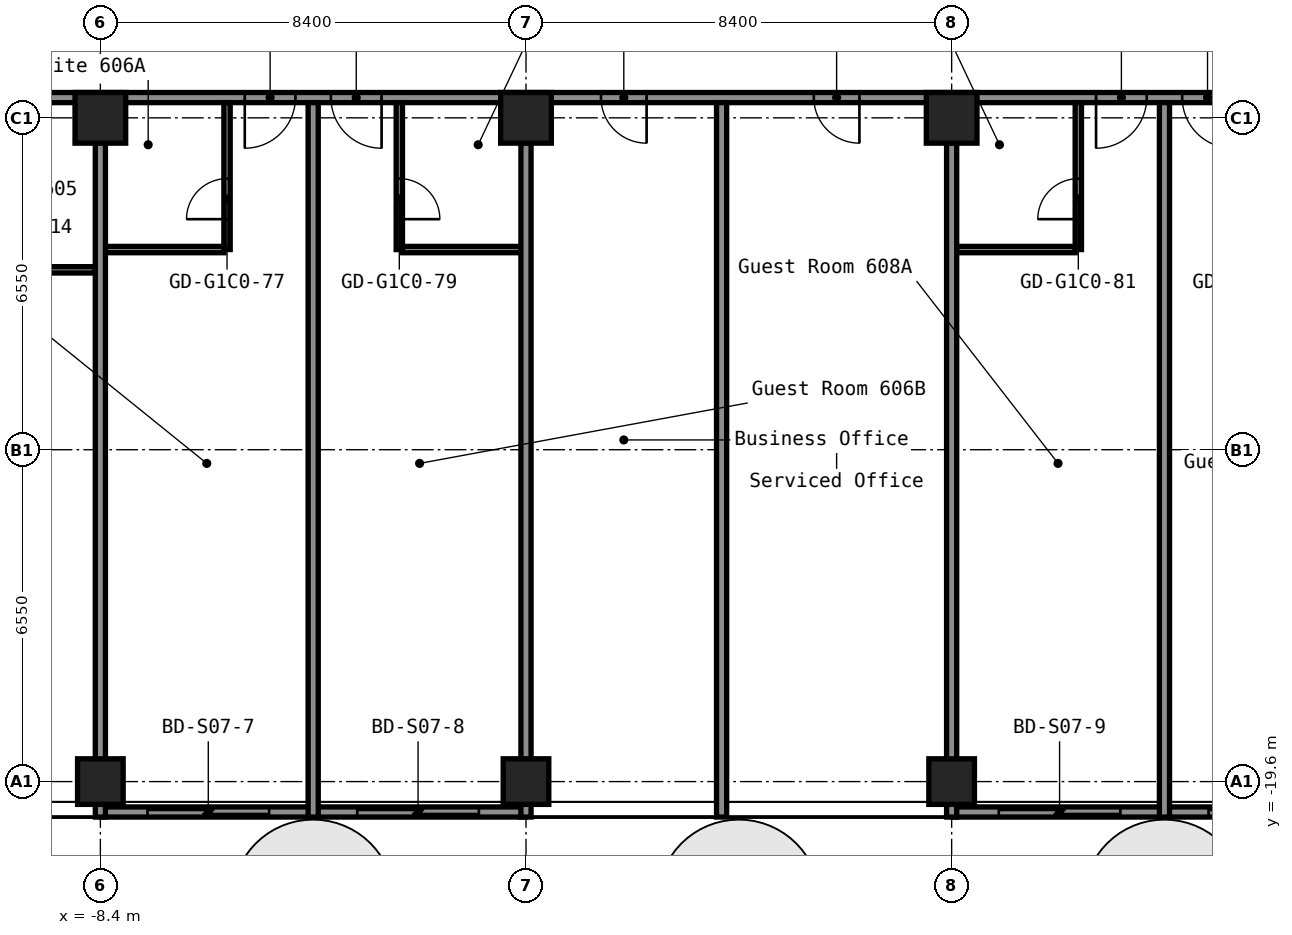
"""IFC4 building model, lengths in metres.
Left out: names, types, materials, properties, quantities, classifications, styles, units other than length and angle.
Written with IfcOpenShell. Run it as: python <this file> out.ifc"""

import sys

from ifc_helpers import new_model, si_unit, direction, frame, frame_2d, origin, origin_2d, place, context, subcontext, project, spatial, rectangle, hollow_rectangle, extrude, element, fill, save


model = new_model("IFC4")
c1 = context("Model", 3, precision=1e-05, world=origin(), true_north=direction((0.0, 1.0)))
c2 = subcontext(c1, "Body", "Model", "MODEL_VIEW")
j1 = project(units=[si_unit("LENGTHUNIT", "METRE"), si_unit("PLANEANGLEUNIT", "RADIAN")], contexts=[c1])
p1 = place(None, origin())
s1 = spatial("IfcSite", under=j1, at=p1, CompositionType="ELEMENT")
p2 = place(p1, origin())
s2 = spatial("IfcBuilding", under=s1, at=p2, CompositionType="ELEMENT")
p3 = place(p2, frame((0.0, 0.0, 26.2)))
s3 = spatial("IfcBuildingStorey", under=s2, at=p3, CompositionType="ELEMENT", Elevation=26.2)
p4 = place(p3, frame((-8.4, -19.6, 0.0), z_axis=(0.0, 0.0, 1.0), x_axis=(1.0, 0.0, 0.0)))
e1 = element("IfcColumn", 1, at=p4, inside=s3, PredefinedType="COLUMN", context=c2, shape_type="SweptSolid", body=[
    extrude(hollow_rectangle(XDim=0.9, YDim=0.9, WallThickness=0.036, at=origin_2d()), origin(), (0.0, 0.0, 1.0), 2.8),
])
p5 = place(p3, frame((-8.4, -6.5, 0.0), z_axis=(0.0, 0.0, 1.0), x_axis=(1.0, 0.0, 0.0)))
e2 = element("IfcColumn", 2, at=p5, inside=s3, PredefinedType="COLUMN", context=c2, shape_type="SweptSolid", body=[
    extrude(hollow_rectangle(XDim=1.0, YDim=1.0, WallThickness=0.04, at=origin_2d()), origin(), (0.0, 0.0, 1.0), 2.8),
])
p6 = place(p3, frame((0.0, -19.6, 0.0), z_axis=(0.0, 0.0, 1.0), x_axis=(1.0, 0.0, 0.0)))
e3 = element("IfcColumn", 3, at=p6, inside=s3, PredefinedType="COLUMN", context=c2, shape_type="SweptSolid", body=[
    extrude(hollow_rectangle(XDim=0.9, YDim=0.9, WallThickness=0.036, at=origin_2d()), origin(), (0.0, 0.0, 1.0), 2.8),
])
p7 = place(p3, frame((0.0, -6.5, 0.0), z_axis=(0.0, 0.0, 1.0), x_axis=(1.0, 0.0, 0.0)))
e4 = element("IfcColumn", 4, at=p7, inside=s3, PredefinedType="COLUMN", context=c2, shape_type="SweptSolid", body=[
    extrude(hollow_rectangle(XDim=1.0, YDim=1.0, WallThickness=0.04, at=origin_2d()), origin(), (0.0, 0.0, 1.0), 2.8),
])
p8 = place(p3, frame((8.4, -19.6, 0.0), z_axis=(0.0, 0.0, 1.0), x_axis=(1.0, 0.0, 0.0)))
e5 = element("IfcColumn", 5, at=p8, inside=s3, PredefinedType="COLUMN", context=c2, shape_type="SweptSolid", body=[
    extrude(hollow_rectangle(XDim=0.9, YDim=0.9, WallThickness=0.036, at=origin_2d()), origin(), (0.0, 0.0, 1.0), 2.8),
])
p9 = place(p3, frame((8.4, -6.5, 0.0), z_axis=(0.0, 0.0, 1.0), x_axis=(1.0, 0.0, 0.0)))
e6 = element("IfcColumn", 6, at=p9, inside=s3, PredefinedType="COLUMN", context=c2, shape_type="SweptSolid", body=[
    extrude(hollow_rectangle(XDim=1.0, YDim=1.0, WallThickness=0.04, at=origin_2d()), origin(), (0.0, 0.0, 1.0), 2.8),
])
p10 = place(p3, frame((-11.738, -9.5, 0.0), z_axis=(0.0, 0.0, 1.0), x_axis=(1.0, 0.0, 0.0)))
e7 = element("IfcWall", 7, at=p10, inside=s3, PredefinedType="PARTITIONING", context=c2, shape_type="SweptSolid", body=[
    extrude(rectangle(XDim=3.238, YDim=0.125, at=frame_2d((1.619, 0.0))), origin(), (0.0, 0.0, 1.0), 2.8),
])
p11 = place(p10, frame((1.238, 0.0, 0.0)))
e8 = element("IfcOpeningElement", 8, at=p11, cuts=e7, PredefinedType="OPENING", context=c2, shape_type="SweptSolid", body=[
    extrude(rectangle(XDim=0.8, YDim=2.1, at=frame_2d((0.4, 1.05))), frame((0.0, 0.073, 0.0), z_axis=(0.0, -1.0, 0.0), x_axis=(1.0, 0.0, 0.0)), (0.0, 0.0, 1.0), 0.145),
])
p12 = place(p3, frame((-8.3, -9.1, 0.0), z_axis=(0.0, 0.0, 1.0), x_axis=(1.0, 0.0, 0.0)))
e9 = element("IfcWall", 9, at=p12, inside=s3, PredefinedType="PARTITIONING", context=c2, shape_type="SweptSolid", body=[
    extrude(rectangle(XDim=2.338, YDim=0.125, at=frame_2d((1.169, 0.0))), origin(), (0.0, 0.0, 1.0), 2.8),
])
for number, where, z_axis, x_axis in (
    (10, (-2.438, -9.1, 0.0), (0.0, 0.0, 1.0), (1.0, 0.0, 0.0)),
    (11, (8.5, -9.1, 0.0), (0.0, 0.0, 1.0), (1.0, 0.0, 0.0)),
):
    element("IfcWall", number, at=place(p3, frame(where, z_axis=z_axis, x_axis=x_axis)), inside=s3, PredefinedType="PARTITIONING", context=c2, shape_type="SweptSolid", body=[
        extrude(rectangle(XDim=2.337, YDim=0.125, at=frame_2d((1.169, 0.0))), origin(), (0.0, 0.0, 1.0), 2.8),
    ])
p13 = place(p3, frame((-16.8, -6.1, 0.0), z_axis=(0.0, 0.0, 1.0), x_axis=(1.0, 0.0, 0.0)))
e12 = element("IfcWall", 12, at=p13, inside=s3, PredefinedType="PARTITIONING", context=c2, shape_type="SweptSolid", body=[
    extrude(rectangle(XDim=33.6, YDim=0.2, at=frame_2d((16.8, 0.0))), origin(), (0.0, 0.0, 1.0), 2.8),
])
p14 = place(p13, frame((2.0, 0.0, 0.0)))
e13 = element("IfcOpeningElement", 13, at=p14, cuts=e12, PredefinedType="OPENING", context=c2, shape_type="SweptSolid", body=[
    extrude(rectangle(XDim=1.0, YDim=2.1, at=frame_2d((0.5, 1.05))), frame((0.0, 0.11, 0.0), z_axis=(0.0, -1.0, 0.0), x_axis=(1.0, 0.0, 0.0)), (0.0, 0.0, 1.0), 0.22),
])
p15 = place(p13, frame((11.25, 0.0, 0.0)))
e14 = element("IfcOpeningElement", 14, at=p15, cuts=e12, PredefinedType="OPENING", context=c2, shape_type="SweptSolid", body=[
    extrude(rectangle(XDim=1.0, YDim=2.1, at=frame_2d((0.5, 1.05))), frame((0.0, 0.11, 0.0), z_axis=(0.0, -1.0, 0.0), x_axis=(1.0, 0.0, 0.0)), (0.0, 0.0, 1.0), 0.22),
])
p16 = place(p13, frame((12.95, 0.0, 0.0)))
e15 = element("IfcOpeningElement", 15, at=p16, cuts=e12, PredefinedType="OPENING", context=c2, shape_type="SweptSolid", body=[
    extrude(rectangle(XDim=1.0, YDim=2.1, at=frame_2d((0.5, 1.05))), frame((0.0, 0.11, 0.0), z_axis=(0.0, -1.0, 0.0), x_axis=(1.0, 0.0, 0.0)), (0.0, 0.0, 1.0), 0.22),
])
p17 = place(p13, frame((18.28, 0.0, 0.0)))
e16 = element("IfcOpeningElement", 16, at=p17, cuts=e12, PredefinedType="OPENING", context=c2, shape_type="SweptSolid", body=[
    extrude(rectangle(XDim=0.9, YDim=2.1, at=frame_2d((0.45, 1.05))), frame((0.0, 0.11, 0.0), z_axis=(0.0, -1.0, 0.0), x_axis=(1.0, 0.0, 0.0)), (0.0, 0.0, 1.0), 0.22),
])
p18 = place(p13, frame((22.48, 0.0, 0.0)))
e17 = element("IfcOpeningElement", 17, at=p18, cuts=e12, PredefinedType="OPENING", context=c2, shape_type="SweptSolid", body=[
    extrude(rectangle(XDim=0.9, YDim=2.1, at=frame_2d((0.45, 1.05))), frame((0.0, 0.11, 0.0), z_axis=(0.0, -1.0, 0.0), x_axis=(1.0, 0.0, 0.0)), (0.0, 0.0, 1.0), 0.22),
])
p19 = place(p13, frame((28.05, 0.0, 0.0)))
e18 = element("IfcOpeningElement", 18, at=p19, cuts=e12, PredefinedType="OPENING", context=c2, shape_type="SweptSolid", body=[
    extrude(rectangle(XDim=1.0, YDim=2.1, at=frame_2d((0.5, 1.05))), frame((0.0, 0.11, 0.0), z_axis=(0.0, -1.0, 0.0), x_axis=(1.0, 0.0, 0.0)), (0.0, 0.0, 1.0), 0.22),
])
p20 = place(p13, frame((29.75, 0.0, 0.0)))
e19 = element("IfcOpeningElement", 19, at=p20, cuts=e12, PredefinedType="OPENING", context=c2, shape_type="SweptSolid", body=[
    extrude(rectangle(XDim=1.0, YDim=2.1, at=frame_2d((0.5, 1.05))), frame((0.0, 0.11, 0.0), z_axis=(0.0, -1.0, 0.0), x_axis=(1.0, 0.0, 0.0)), (0.0, 0.0, 1.0), 0.22),
])
p21 = place(p3, frame((-8.4, -20.3, 0.0), z_axis=(0.0, 0.0, 1.0), x_axis=(0.0, 1.0, 0.0)))
e20 = element("IfcWall", 20, at=p21, inside=s3, PredefinedType="PARTITIONING", context=c2, shape_type="SweptSolid", body=[
    extrude(rectangle(XDim=13.31, YDim=0.2, at=frame_2d((6.655, 0.0))), origin(), (0.0, 0.0, 1.0), 2.8),
])
p22 = place(p3, frame((-5.9, -9.1, 0.0), z_axis=(0.0, 0.0, 1.0), x_axis=(0.0, 1.0, 0.0)))
e21 = element("IfcWall", 21, at=p22, inside=s3, PredefinedType="PARTITIONING", context=c2, shape_type="SweptSolid", body=[
    extrude(rectangle(XDim=2.9, YDim=0.125, at=frame_2d((1.45, 0.0))), origin(), (0.0, 0.0, 1.0), 2.8),
])
p23 = place(p22, frame((0.6, 0.0, 0.0)))
e22 = element("IfcOpeningElement", 22, at=p23, cuts=e21, PredefinedType="OPENING", context=c2, shape_type="SweptSolid", body=[
    extrude(rectangle(XDim=0.8, YDim=2.1, at=frame_2d((0.4, 1.05))), frame((0.0, 0.073, 0.0), z_axis=(0.0, -1.0, 0.0), x_axis=(1.0, 0.0, 0.0)), (0.0, 0.0, 1.0), 0.145),
])
p24 = place(p3, frame((-4.2, -20.3, 0.0), z_axis=(0.0, 0.0, 1.0), x_axis=(0.0, 1.0, 0.0)))
e23 = element("IfcWall", 23, at=p24, inside=s3, PredefinedType="PARTITIONING", context=c2, shape_type="SweptSolid", body=[
    extrude(rectangle(XDim=14.1, YDim=0.2, at=frame_2d((7.05, 0.0))), origin(), (0.0, 0.0, 1.0), 2.8),
])
p25 = place(p3, frame((-2.5, -9.1, 0.0), z_axis=(0.0, 0.0, 1.0), x_axis=(0.0, 1.0, 0.0)))
e24 = element("IfcWall", 24, at=p25, inside=s3, PredefinedType="PARTITIONING", context=c2, shape_type="SweptSolid", body=[
    extrude(rectangle(XDim=2.9, YDim=0.125, at=frame_2d((1.45, 0.0))), origin(), (0.0, 0.0, 1.0), 2.8),
])
p26 = place(p25, frame((0.6, 0.0, 0.0)))
e25 = element("IfcOpeningElement", 25, at=p26, cuts=e24, PredefinedType="OPENING", context=c2, shape_type="SweptSolid", body=[
    extrude(rectangle(XDim=0.8, YDim=2.1, at=frame_2d((0.4, 1.05))), frame((0.0, 0.073, 0.0), z_axis=(0.0, -1.0, 0.0), x_axis=(1.0, 0.0, 0.0)), (0.0, 0.0, 1.0), 0.145),
])
p27 = place(p3, frame((0.0, -20.3, 0.0), z_axis=(0.0, 0.0, 1.0), x_axis=(0.0, 1.0, 0.0)))
e26 = element("IfcWall", 26, at=p27, inside=s3, PredefinedType="PARTITIONING", context=c2, shape_type="SweptSolid", body=[
    extrude(rectangle(XDim=13.31, YDim=0.2, at=frame_2d((6.655, 0.0))), origin(), (0.0, 0.0, 1.0), 2.8),
])
p28 = place(p3, frame((3.86, -20.3, 0.0), z_axis=(0.0, 0.0, 1.0), x_axis=(0.0, 1.0, 0.0)))
e27 = element("IfcWall", 27, at=p28, inside=s3, PredefinedType="PARTITIONING", context=c2, shape_type="SweptSolid", body=[
    extrude(rectangle(XDim=14.1, YDim=0.2, at=frame_2d((7.05, 0.0))), origin(), (0.0, 0.0, 1.0), 2.8),
])
p29 = place(p3, frame((8.4, -20.3, 0.0), z_axis=(0.0, 0.0, 1.0), x_axis=(0.0, 1.0, 0.0)))
e28 = element("IfcWall", 28, at=p29, inside=s3, PredefinedType="PARTITIONING", context=c2, shape_type="SweptSolid", body=[
    extrude(rectangle(XDim=13.31, YDim=0.2, at=frame_2d((6.655, 0.0))), origin(), (0.0, 0.0, 1.0), 2.8),
])
p30 = place(p3, frame((10.9, -9.1, 0.0), z_axis=(0.0, 0.0, 1.0), x_axis=(0.0, 1.0, 0.0)))
e29 = element("IfcWall", 29, at=p30, inside=s3, PredefinedType="PARTITIONING", context=c2, shape_type="SweptSolid", body=[
    extrude(rectangle(XDim=2.9, YDim=0.125, at=frame_2d((1.45, 0.0))), origin(), (0.0, 0.0, 1.0), 2.8),
])
p31 = place(p30, frame((0.6, 0.0, 0.0)))
e30 = element("IfcOpeningElement", 30, at=p31, cuts=e29, PredefinedType="OPENING", context=c2, shape_type="SweptSolid", body=[
    extrude(rectangle(XDim=0.8, YDim=2.1, at=frame_2d((0.4, 1.05))), frame((0.0, 0.073, 0.0), z_axis=(0.0, -1.0, 0.0), x_axis=(1.0, 0.0, 0.0)), (0.0, 0.0, 1.0), 0.145),
])
p32 = place(p3, frame((12.6, -20.3, 0.0), z_axis=(0.0, 0.0, 1.0), x_axis=(0.0, 1.0, 0.0)))
e31 = element("IfcWall", 31, at=p32, inside=s3, PredefinedType="PARTITIONING", context=c2, shape_type="SweptSolid", body=[
    extrude(rectangle(XDim=14.1, YDim=0.2, at=frame_2d((7.05, 0.0))), origin(), (0.0, 0.0, 1.0), 2.8),
])
p33 = place(p3, frame((-8.38, -20.2, 0.0), z_axis=(0.0, 0.0, 1.0), x_axis=(1.0, 0.0, 0.0)))
p34 = place(p33, frame((0.91, 0.0, 0.0)))
p35 = place(p34, frame((2.4, 0.0, 0.0), z_axis=(0.0, 0.0, 1.0), x_axis=(-1.0, 0.0, 0.0)))
e32 = element("IfcDoor", 32, at=p35, inside=s3, OperationType="SLIDING_TO_LEFT", PredefinedType="DOOR", context=c2, shape_type="SweptSolid", body=[
    extrude(rectangle(XDim=2.4, YDim=2.2, at=frame_2d((1.2, 1.1))), frame((0.0, 0.025, 0.0), z_axis=(0.0, -1.0, 0.0), x_axis=(1.0, 0.0, 0.0)), (0.0, 0.0, 1.0), 0.05),
])
p36 = place(p3, frame((-4.24, -20.2, 0.0), z_axis=(0.0, 0.0, 1.0), x_axis=(1.0, 0.0, 0.0)))
p37 = place(p36, frame((0.91, 0.0, 0.0)))
p38 = place(p37, frame((2.4, 0.0, 0.0), z_axis=(0.0, 0.0, 1.0), x_axis=(-1.0, 0.0, 0.0)))
e33 = element("IfcDoor", 33, at=p38, inside=s3, OperationType="SLIDING_TO_LEFT", PredefinedType="DOOR", context=c2, shape_type="SweptSolid", body=[
    extrude(rectangle(XDim=2.4, YDim=2.2, at=frame_2d((1.2, 1.1))), frame((0.0, 0.025, 0.0), z_axis=(0.0, -1.0, 0.0), x_axis=(1.0, 0.0, 0.0)), (0.0, 0.0, 1.0), 0.05),
])
p39 = place(p3, frame((8.42, -20.2, 0.0), z_axis=(0.0, 0.0, 1.0), x_axis=(1.0, 0.0, 0.0)))
p40 = place(p39, frame((0.91, 0.0, 0.0)))
p41 = place(p40, frame((2.4, 0.0, 0.0), z_axis=(0.0, 0.0, 1.0), x_axis=(-1.0, 0.0, 0.0)))
e34 = element("IfcDoor", 34, at=p41, inside=s3, OperationType="SLIDING_TO_LEFT", PredefinedType="DOOR", context=c2, shape_type="SweptSolid", body=[
    extrude(rectangle(XDim=2.4, YDim=2.2, at=frame_2d((1.2, 1.1))), frame((0.0, 0.025, 0.0), z_axis=(0.0, -1.0, 0.0), x_axis=(1.0, 0.0, 0.0)), (0.0, 0.0, 1.0), 0.05),
])
p42 = place(p3, frame((12.56, -20.2, 0.0), z_axis=(0.0, 0.0, 1.0), x_axis=(1.0, 0.0, 0.0)))
p43 = place(p42, frame((0.91, 0.0, 0.0)))
p44 = place(p43, frame((2.4, 0.0, 0.0), z_axis=(0.0, 0.0, 1.0), x_axis=(-1.0, 0.0, 0.0)))
e35 = element("IfcDoor", 35, at=p44, inside=s3, OperationType="SLIDING_TO_LEFT", PredefinedType="DOOR", context=c2, shape_type="SweptSolid", body=[
    extrude(rectangle(XDim=2.4, YDim=2.2, at=frame_2d((1.2, 1.1))), frame((0.0, 0.025, 0.0), z_axis=(0.0, -1.0, 0.0), x_axis=(1.0, 0.0, 0.0)), (0.0, 0.0, 1.0), 0.05),
])
p45 = place(p15, origin())
e36 = element("IfcDoor", 36, at=p45, inside=s3, OperationType="SINGLE_SWING_LEFT", PredefinedType="DOOR", context=c2, shape_type="SweptSolid", body=[
    extrude(rectangle(XDim=1.0, YDim=2.1, at=frame_2d((0.5, 1.05))), frame((0.0, 0.025, 0.0), z_axis=(0.0, -1.0, 0.0), x_axis=(1.0, 0.0, 0.0)), (0.0, 0.0, 1.0), 0.05),
])
fill(e14, e36)
p46 = place(p16, origin())
e37 = element("IfcDoor", 37, at=p46, inside=s3, OperationType="SINGLE_SWING_RIGHT", PredefinedType="DOOR", context=c2, shape_type="SweptSolid", body=[
    extrude(rectangle(XDim=1.0, YDim=2.1, at=frame_2d((0.5, 1.05))), frame((0.0, 0.025, 0.0), z_axis=(0.0, -1.0, 0.0), x_axis=(1.0, 0.0, 0.0)), (0.0, 0.0, 1.0), 0.05),
])
fill(e15, e37)
p47 = place(p17, origin())
e38 = element("IfcDoor", 38, at=p47, inside=s3, OperationType="SINGLE_SWING_RIGHT", PredefinedType="DOOR", context=c2, shape_type="SweptSolid", body=[
    extrude(rectangle(XDim=0.9, YDim=2.1, at=frame_2d((0.45, 1.05))), frame((0.0, 0.025, 0.0), z_axis=(0.0, -1.0, 0.0), x_axis=(1.0, 0.0, 0.0)), (0.0, 0.0, 1.0), 0.05),
])
fill(e16, e38)
p48 = place(p18, origin())
e39 = element("IfcDoor", 39, at=p48, inside=s3, OperationType="SINGLE_SWING_RIGHT", PredefinedType="DOOR", context=c2, shape_type="SweptSolid", body=[
    extrude(rectangle(XDim=0.9, YDim=2.1, at=frame_2d((0.45, 1.05))), frame((0.0, 0.025, 0.0), z_axis=(0.0, -1.0, 0.0), x_axis=(1.0, 0.0, 0.0)), (0.0, 0.0, 1.0), 0.05),
])
fill(e17, e39)
p49 = place(p19, origin())
e40 = element("IfcDoor", 40, at=p49, inside=s3, OperationType="SINGLE_SWING_LEFT", PredefinedType="DOOR", context=c2, shape_type="SweptSolid", body=[
    extrude(rectangle(XDim=1.0, YDim=2.1, at=frame_2d((0.5, 1.05))), frame((0.0, 0.025, 0.0), z_axis=(0.0, -1.0, 0.0), x_axis=(1.0, 0.0, 0.0)), (0.0, 0.0, 1.0), 0.05),
])
fill(e18, e40)
p50 = place(p20, origin())
e41 = element("IfcDoor", 41, at=p50, inside=s3, OperationType="SINGLE_SWING_RIGHT", PredefinedType="DOOR", context=c2, shape_type="SweptSolid", body=[
    extrude(rectangle(XDim=1.0, YDim=2.1, at=frame_2d((0.5, 1.05))), frame((0.0, 0.025, 0.0), z_axis=(0.0, -1.0, 0.0), x_axis=(1.0, 0.0, 0.0)), (0.0, 0.0, 1.0), 0.05),
])
fill(e19, e41)
p51 = place(p23, origin())
e42 = element("IfcDoor", 42, at=p51, inside=s3, OperationType="SINGLE_SWING_RIGHT", PredefinedType="DOOR", context=c2, shape_type="SweptSolid", body=[
    extrude(rectangle(XDim=0.8, YDim=2.1, at=frame_2d((0.4, 1.05))), frame((0.0, 0.025, 0.0), z_axis=(0.0, -1.0, 0.0), x_axis=(1.0, 0.0, 0.0)), (0.0, 0.0, 1.0), 0.05),
])
fill(e22, e42)
p52 = place(p26, origin())
e43 = element("IfcDoor", 43, at=p52, inside=s3, OperationType="SINGLE_SWING_LEFT", PredefinedType="DOOR", context=c2, shape_type="SweptSolid", body=[
    extrude(rectangle(XDim=0.8, YDim=2.1, at=frame_2d((0.4, 1.05))), frame((0.0, 0.025, 0.0), z_axis=(0.0, -1.0, 0.0), x_axis=(1.0, 0.0, 0.0)), (0.0, 0.0, 1.0), 0.05),
])
fill(e25, e43)
p53 = place(p31, origin())
e44 = element("IfcDoor", 44, at=p53, inside=s3, OperationType="SINGLE_SWING_RIGHT", PredefinedType="DOOR", context=c2, shape_type="SweptSolid", body=[
    extrude(rectangle(XDim=0.8, YDim=2.1, at=frame_2d((0.4, 1.05))), frame((0.0, 0.025, 0.0), z_axis=(0.0, -1.0, 0.0), x_axis=(1.0, 0.0, 0.0)), (0.0, 0.0, 1.0), 0.05),
])
fill(e30, e44)
save(model, sys.argv[1])
